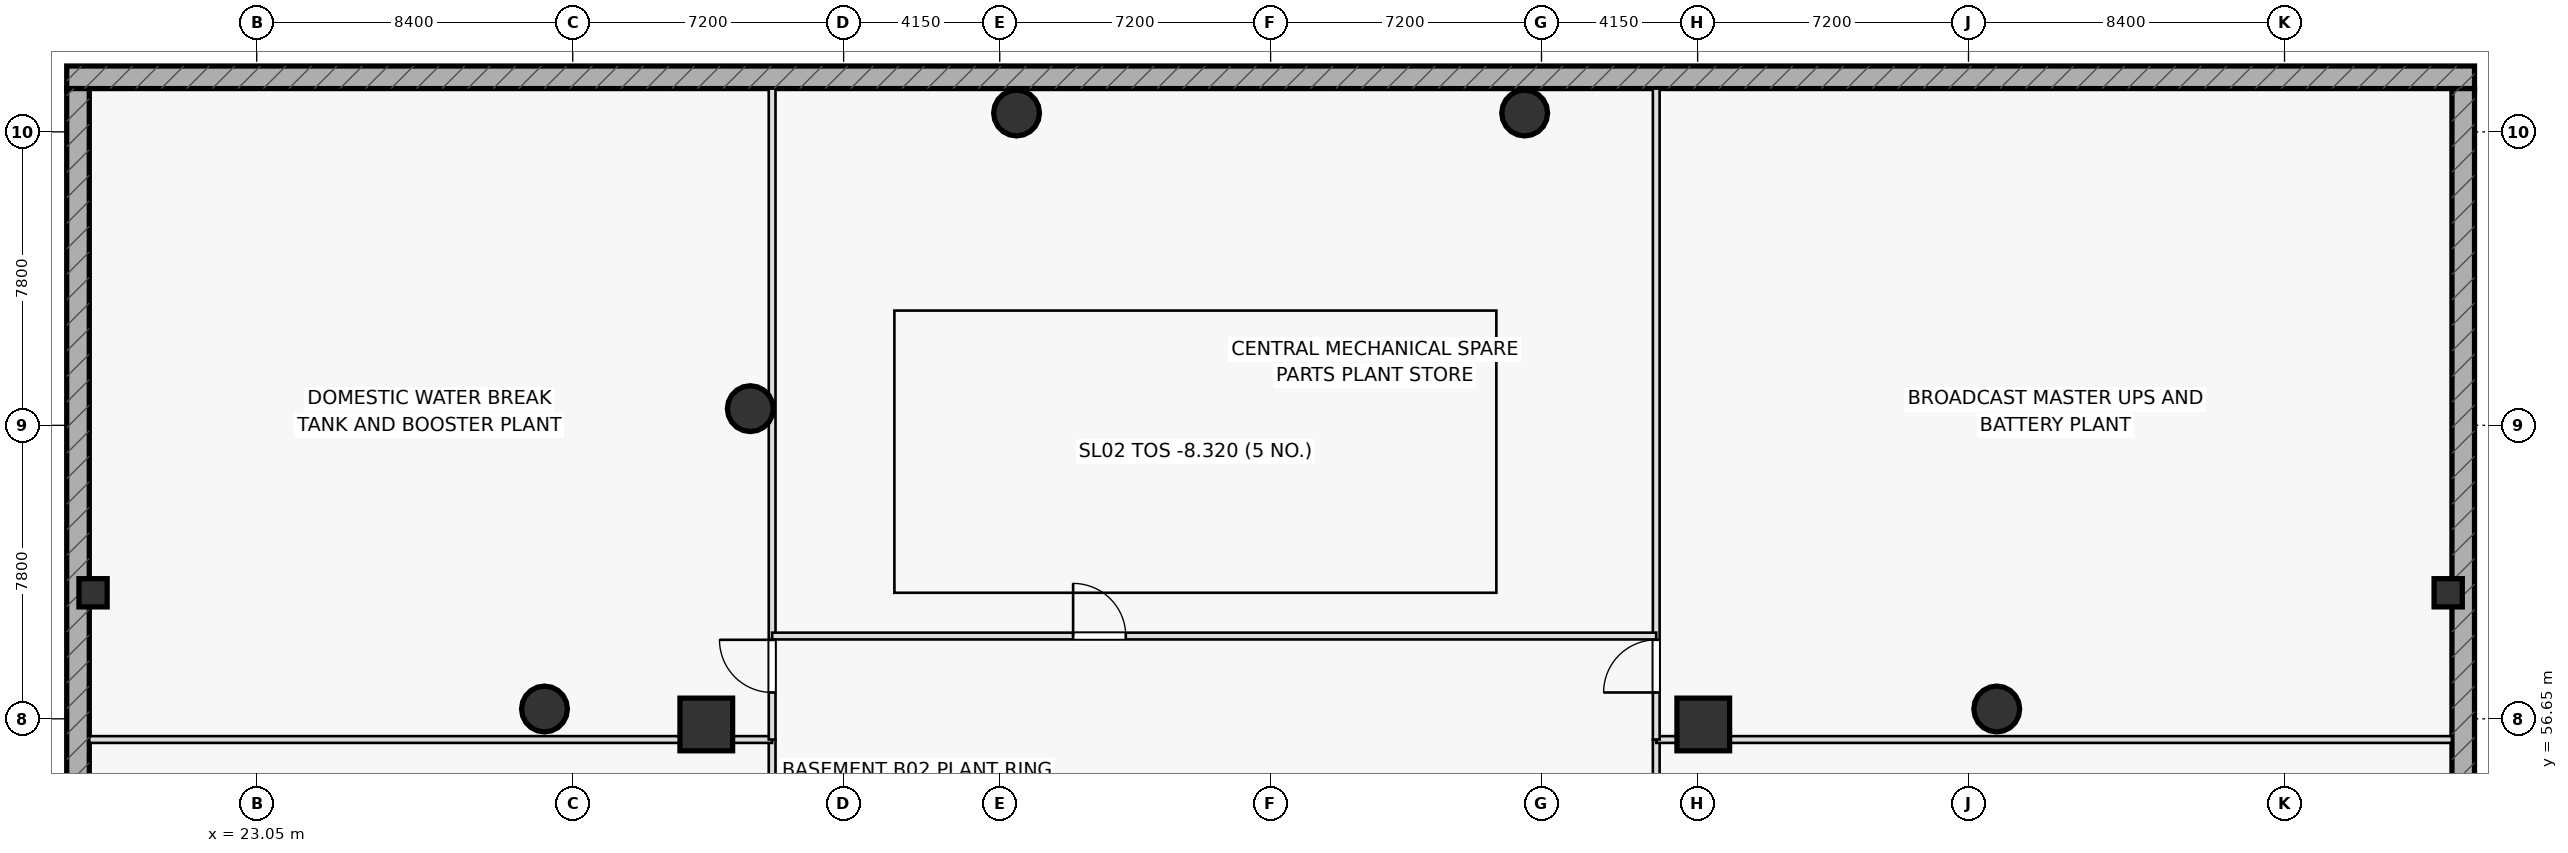
"""IFC4 building model, lengths in metres.
Left out: names, types, materials, properties, quantities, classifications, styles, units other than length and angle.
Written with IfcOpenShell. Run it as: python <this file> out.ifc"""

import sys

from ifc_helpers import new_model, si_unit, direction, frame, frame_2d, origin, origin_2d, place, context, subcontext, project, spatial, rectangle, hollow_circle, extrude, element, fill, save


model = new_model("IFC4")
c1 = context("Model", 3, precision=1e-05, world=origin(), true_north=direction((0.0, 1.0)))
c2 = subcontext(c1, "Body", "Model", "MODEL_VIEW")
j1 = project(units=[si_unit("LENGTHUNIT", "METRE"), si_unit("PLANEANGLEUNIT", "RADIAN")], contexts=[c1])
p1 = place(None, origin())
s1 = spatial("IfcSite", under=j1, at=p1, CompositionType="ELEMENT")
p2 = place(p1, origin())
s2 = spatial("IfcBuilding", under=s1, at=p2, CompositionType="ELEMENT")
p3 = place(p2, frame((0.0, 0.0, -8.7)))
s3 = spatial("IfcBuildingStorey", under=s2, at=p3, CompositionType="ELEMENT", Elevation=-8.7)
p4 = place(p3, frame((18.0, 73.7, 0.0), z_axis=(0.0, 0.0, 1.0), x_axis=(1.0, 0.0, 0.0)))
e1 = element("IfcWall", 1, at=p4, inside=s3, PredefinedType="USERDEFINED", context=c2, shape_type="SweptSolid", body=[
    extrude(rectangle(XDim=64.0, YDim=0.6, at=frame_2d((32.0, 0.0))), origin(), (0.0, 0.0, 1.0), 4.15),
])
for number, where, z_axis, x_axis in (
    (2, (18.3, 16.6, 0.0), (0.0, 0.0, 1.0), (0.0, 1.0, 0.0)),
    (3, (81.7, 16.6, 0.0), (0.0, 0.0, 1.0), (0.0, 1.0, 0.0)),
):
    element("IfcWall", number, at=place(p3, frame(where, z_axis=z_axis, x_axis=x_axis)), inside=s3, PredefinedType="USERDEFINED", context=c2, shape_type="SweptSolid", body=[
        extrude(rectangle(XDim=56.8, YDim=0.6, at=frame_2d((28.4, 0.0))), origin(), (0.0, 0.0, 1.0), 4.15),
    ])
for number, where, z_axis, x_axis in (
    (4, (18.7, 60.0, 0.0), (0.0, 0.0, 1.0), (1.0, 0.0, 0.0)),
    (5, (81.3, 60.0, 0.0), (0.0, 0.0, 1.0), (1.0, 0.0, 0.0)),
):
    element("IfcColumn", number, at=place(p3, frame(where, z_axis=z_axis, x_axis=x_axis)), inside=s3, PredefinedType="PILASTER", context=c2, shape_type="SweptSolid", body=[
        extrude(rectangle(XDim=0.75, YDim=0.75, at=origin_2d()), origin(), (0.0, 0.0, 1.0), 4.15),
    ])
for number, where, z_axis, x_axis in (
    (6, (61.5, 56.5, 0.0), (0.0, 0.0, 1.0), (1.0, 0.0, 0.0)),
    (7, (35.0, 56.5, 0.0), (0.0, 0.0, 1.0), (1.0, 0.0, 0.0)),
):
    element("IfcColumn", number, at=place(p3, frame(where, z_axis=z_axis, x_axis=x_axis)), inside=s3, PredefinedType="COLUMN", context=c2, shape_type="SweptSolid", body=[
        extrude(rectangle(XDim=1.4, YDim=1.4, at=origin_2d()), origin(), (0.0, 0.0, 1.0), 4.15),
    ])
for number, where, z_axis, x_axis in (
    (8, (43.247, 72.751, 0.0), (0.0, 0.0, 1.0), (1.0, 0.0, 0.0)),
    (9, (36.17, 64.893, 0.0), (0.0, 0.0, 1.0), (1.0, 0.0, 0.0)),
    (10, (30.699, 56.911, 0.0), (0.0, 0.0, 1.0), (1.0, 0.0, 0.0)),
    (11, (69.301, 56.911, 0.0), (0.0, 0.0, 1.0), (1.0, 0.0, 0.0)),
    (12, (56.753, 72.751, 0.0), (0.0, 0.0, 1.0), (1.0, 0.0, 0.0)),
):
    element("IfcColumn", number, at=place(p3, frame(where, z_axis=z_axis, x_axis=x_axis)), inside=s3, PredefinedType="COLUMN", context=c2, shape_type="SweptSolid", body=[
        extrude(hollow_circle(Radius=0.61, WallThickness=0.05, at=origin_2d()), origin(), (0.0, 0.0, 1.0), 4.15),
    ])
p5 = place(p3, frame((36.75, 37.72, 0.0), z_axis=(0.0, 0.0, 1.0), x_axis=(0.0, 1.0, 0.0)))
e13 = element("IfcWall", 13, at=p5, inside=s3, PredefinedType="PARTITIONING", context=c2, shape_type="SweptSolid", body=[
    extrude(rectangle(XDim=18.38, YDim=0.18, at=frame_2d((9.19, 0.0))), origin(), (0.0, 0.0, 1.0), 3.175),
])
p6 = place(p5, frame((6.0, 0.0, 0.0)))
e14 = element("IfcOpeningElement", 14, at=p6, cuts=e13, PredefinedType="OPENING", context=c2, shape_type="SweptSolid", body=[
    extrude(rectangle(XDim=1.4, YDim=2.15, at=frame_2d((0.7, 1.075))), frame((0.0, 0.1, 0.0), z_axis=(0.0, -1.0, 0.0), x_axis=(1.0, 0.0, 0.0)), (0.0, 0.0, 1.0), 0.2),
])
p7 = place(p3, frame((18.6, 56.1, 0.0), z_axis=(0.0, 0.0, 1.0), x_axis=(1.0, 0.0, 0.0)))
e15 = element("IfcWall", 15, at=p7, inside=s3, PredefinedType="PARTITIONING", context=c2, shape_type="SweptSolid", body=[
    extrude(rectangle(XDim=18.15, YDim=0.18, at=frame_2d((9.075, 0.0))), origin(), (0.0, 0.0, 1.0), 3.175),
])
p8 = place(p3, frame((36.75, 56.1, 0.0), z_axis=(0.0, 0.0, 1.0), x_axis=(0.0, 1.0, 0.0)))
e16 = element("IfcWall", 16, at=p8, inside=s3, PredefinedType="PARTITIONING", context=c2, shape_type="SweptSolid", body=[
    extrude(rectangle(XDim=17.3, YDim=0.18, at=frame_2d((8.65, 0.0))), origin(), (0.0, 0.0, 1.0), 3.175),
])
p9 = place(p8, frame((1.25, 0.0, 0.0)))
e17 = element("IfcOpeningElement", 17, at=p9, cuts=e16, PredefinedType="OPENING", context=c2, shape_type="SweptSolid", body=[
    extrude(rectangle(XDim=1.4, YDim=2.15, at=frame_2d((0.7, 1.075))), frame((0.0, 0.1, 0.0), z_axis=(0.0, -1.0, 0.0), x_axis=(1.0, 0.0, 0.0)), (0.0, 0.0, 1.0), 0.2),
])
p10 = place(p3, frame((60.25, 37.72, 0.0), z_axis=(0.0, 0.0, 1.0), x_axis=(0.0, 1.0, 0.0)))
e18 = element("IfcWall", 18, at=p10, inside=s3, PredefinedType="PARTITIONING", context=c2, shape_type="SweptSolid", body=[
    extrude(rectangle(XDim=18.38, YDim=0.18, at=frame_2d((9.19, 0.0))), origin(), (0.0, 0.0, 1.0), 3.175),
])
p11 = place(p10, frame((6.0, 0.0, 0.0)))
e19 = element("IfcOpeningElement", 19, at=p11, cuts=e18, PredefinedType="OPENING", context=c2, shape_type="SweptSolid", body=[
    extrude(rectangle(XDim=1.4, YDim=2.15, at=frame_2d((0.7, 1.075))), frame((0.0, 0.1, 0.0), z_axis=(0.0, -1.0, 0.0), x_axis=(1.0, 0.0, 0.0)), (0.0, 0.0, 1.0), 0.2),
])
p12 = place(p3, frame((60.25, 56.1, 0.0), z_axis=(0.0, 0.0, 1.0), x_axis=(1.0, 0.0, 0.0)))
e20 = element("IfcWall", 20, at=p12, inside=s3, PredefinedType="PARTITIONING", context=c2, shape_type="SweptSolid", body=[
    extrude(rectangle(XDim=21.15, YDim=0.18, at=frame_2d((10.575, 0.0))), origin(), (0.0, 0.0, 1.0), 3.175),
])
p13 = place(p3, frame((60.25, 56.1, 0.0), z_axis=(0.0, 0.0, 1.0), x_axis=(0.0, 1.0, 0.0)))
e21 = element("IfcWall", 21, at=p13, inside=s3, PredefinedType="PARTITIONING", context=c2, shape_type="SweptSolid", body=[
    extrude(rectangle(XDim=17.3, YDim=0.18, at=frame_2d((8.65, 0.0))), origin(), (0.0, 0.0, 1.0), 3.175),
])
p14 = place(p13, frame((1.25, 0.0, 0.0)))
e22 = element("IfcOpeningElement", 22, at=p14, cuts=e21, PredefinedType="OPENING", context=c2, shape_type="SweptSolid", body=[
    extrude(rectangle(XDim=1.4, YDim=2.15, at=frame_2d((0.7, 1.075))), frame((0.0, 0.1, 0.0), z_axis=(0.0, -1.0, 0.0), x_axis=(1.0, 0.0, 0.0)), (0.0, 0.0, 1.0), 0.2),
])
p15 = place(p3, frame((36.75, 58.85, 0.0), z_axis=(0.0, 0.0, 1.0), x_axis=(1.0, 0.0, 0.0)))
e23 = element("IfcWall", 23, at=p15, inside=s3, PredefinedType="PARTITIONING", context=c2, shape_type="SweptSolid", body=[
    extrude(rectangle(XDim=23.5, YDim=0.18, at=frame_2d((11.75, 0.0))), origin(), (0.0, 0.0, 1.0), 4.15),
])
p16 = place(p15, frame((8.0, 0.0, 0.0)))
e24 = element("IfcOpeningElement", 24, at=p16, cuts=e23, PredefinedType="OPENING", context=c2, shape_type="SweptSolid", body=[
    extrude(rectangle(XDim=1.4, YDim=2.15, at=frame_2d((0.7, 1.075))), frame((0.0, 0.1, 0.0), z_axis=(0.0, -1.0, 0.0), x_axis=(1.0, 0.0, 0.0)), (0.0, 0.0, 1.0), 0.2),
])
p17 = place(p9, origin())
e25 = element("IfcDoor", 25, at=p17, inside=s3, OperationType="SINGLE_SWING_RIGHT", PredefinedType="DOOR", context=c2, shape_type="SweptSolid", body=[
    extrude(rectangle(XDim=1.4, YDim=2.15, at=frame_2d((0.7, 1.075))), frame((0.0, 0.025, 0.0), z_axis=(0.0, -1.0, 0.0), x_axis=(1.0, 0.0, 0.0)), (0.0, 0.0, 1.0), 0.05),
])
fill(e17, e25)
p18 = place(p14, origin())
e26 = element("IfcDoor", 26, at=p18, inside=s3, OperationType="SINGLE_SWING_LEFT", PredefinedType="DOOR", context=c2, shape_type="SweptSolid", body=[
    extrude(rectangle(XDim=1.4, YDim=2.15, at=frame_2d((0.7, 1.075))), frame((0.0, 0.025, 0.0), z_axis=(0.0, -1.0, 0.0), x_axis=(1.0, 0.0, 0.0)), (0.0, 0.0, 1.0), 0.05),
])
fill(e22, e26)
p19 = place(p16, origin())
e27 = element("IfcDoor", 27, at=p19, inside=s3, OperationType="SINGLE_SWING_LEFT", PredefinedType="DOOR", context=c2, shape_type="SweptSolid", body=[
    extrude(rectangle(XDim=1.4, YDim=2.15, at=frame_2d((0.7, 1.075))), frame((0.0, 0.025, 0.0), z_axis=(0.0, -1.0, 0.0), x_axis=(1.0, 0.0, 0.0)), (0.0, 0.0, 1.0), 0.05),
])
fill(e24, e27)
save(model, sys.argv[1])
